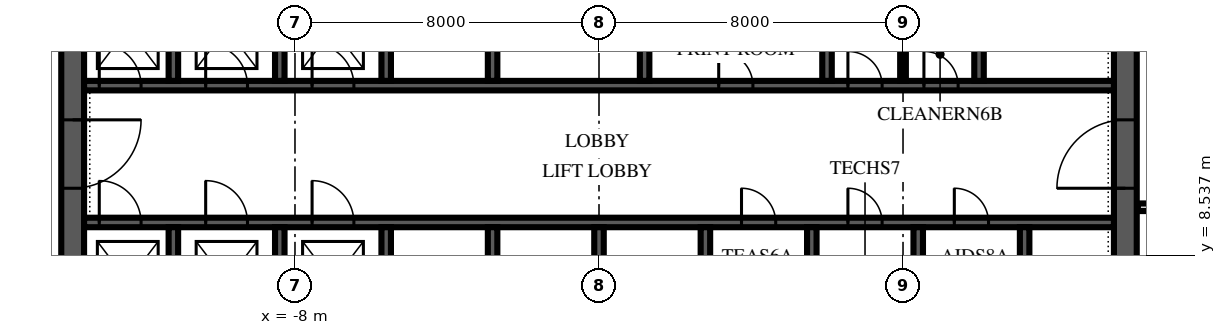
"""IFC4 building model, lengths in metres.
Left out: names, types, materials, properties, quantities, classifications, styles, units other than length and angle.
Written with IfcOpenShell. Run it as: python <this file> out.ifc"""

import sys

from ifc_helpers import new_model, si_unit, direction, frame, frame_2d, origin, place, context, subcontext, project, spatial, polyline, rectangle, outline, extrude, element, fill, save


model = new_model("IFC4")
c1 = context("Model", 3, precision=1e-05, world=origin(), true_north=direction((0.0, 1.0)))
c2 = subcontext(c1, "Body", "Model", "MODEL_VIEW")
j1 = project(units=[si_unit("LENGTHUNIT", "METRE"), si_unit("PLANEANGLEUNIT", "RADIAN")], contexts=[c1])
p1 = place(None, origin())
s1 = spatial("IfcSite", under=j1, at=p1, CompositionType="ELEMENT")
p2 = place(p1, origin())
s2 = spatial("IfcBuilding", under=s1, at=p2, CompositionType="ELEMENT")
p3 = place(p2, frame((0.0, 0.0, 214.0)))
s3 = spatial("IfcBuildingStorey", under=s2, at=p3, CompositionType="ELEMENT", Elevation=214.0)
p4 = place(p3, frame((13.85, 6.15, 0.0), z_axis=(0.0, 0.0, 1.0), x_axis=(0.0, 1.0, 0.0)))
e1 = element("IfcWall", 1, at=p4, inside=s3, PredefinedType="SHEAR", context=c2, shape_type="SweptSolid", body=[
    extrude(outline(polyline([(0.0, -0.3), (17.7, -0.3), (17.7, 0.0), (17.4, 0.0), (17.4, 0.3), (0.3, 0.3), (0.3, 0.0), (0.0, 0.0), (0.0, -0.3)])), origin(), (0.0, 0.0, 1.0), 4.0),
])
p5 = place(p4, frame((4.15, 0.0, 0.0)))
e2 = element("IfcOpeningElement", 2, at=p5, cuts=e1, PredefinedType="OPENING", context=c2, shape_type="SweptSolid", body=[
    extrude(rectangle(XDim=1.8, YDim=2.4, at=frame_2d((0.9, 1.2))), frame((0.0, 0.315, 0.0), z_axis=(0.0, -1.0, 0.0), x_axis=(1.0, 0.0, 0.0)), (0.0, 0.0, 1.0), 0.63),
])
p6 = place(p3, frame((-13.85, 23.85, 0.0), z_axis=(0.0, 0.0, 1.0), x_axis=(0.0, -1.0, 0.0)))
e3 = element("IfcWall", 3, at=p6, inside=s3, PredefinedType="SHEAR", context=c2, shape_type="SweptSolid", body=[
    extrude(outline(polyline([(0.0, -0.3), (17.7, -0.3), (17.7, 0.0), (17.4, 0.0), (17.4, 0.3), (0.3, 0.3), (0.3, 0.0), (0.0, 0.0), (0.0, -0.3)])), origin(), (0.0, 0.0, 1.0), 4.0),
])
p7 = place(p6, frame((11.75, 0.0, 0.0)))
e4 = element("IfcOpeningElement", 4, at=p7, cuts=e3, PredefinedType="OPENING", context=c2, shape_type="SweptSolid", body=[
    extrude(rectangle(XDim=1.8, YDim=2.4, at=frame_2d((0.9, 1.2))), frame((0.0, 0.315, 0.0), z_axis=(0.0, -1.0, 0.0), x_axis=(1.0, 0.0, 0.0)), (0.0, 0.0, 1.0), 0.63),
])
p8 = place(p3, frame((-13.55, 9.4, 0.0), z_axis=(0.0, 0.0, 1.0), x_axis=(1.0, 0.0, 0.0)))
e5 = element("IfcWall", 5, at=p8, inside=s3, PredefinedType="SHEAR", context=c2, shape_type="SweptSolid", body=[
    extrude(rectangle(XDim=27.1, YDim=0.25, at=frame_2d((13.55, 0.0))), origin(), (0.0, 0.0, 1.0), 4.0),
])
p9 = place(p8, frame((0.4, 0.0, 0.0)))
e6 = element("IfcOpeningElement", 6, at=p9, cuts=e5, PredefinedType="OPENING", context=c2, shape_type="SweptSolid", body=[
    extrude(rectangle(XDim=1.1, YDim=2.1, at=frame_2d((0.55, 1.05))), frame((0.0, 0.14, 0.0), z_axis=(0.0, -1.0, 0.0), x_axis=(1.0, 0.0, 0.0)), (0.0, 0.0, 1.0), 0.28),
])
p10 = place(p8, frame((3.2, 0.0, 0.0)))
e7 = element("IfcOpeningElement", 7, at=p10, cuts=e5, PredefinedType="OPENING", context=c2, shape_type="SweptSolid", body=[
    extrude(rectangle(XDim=1.1, YDim=2.1, at=frame_2d((0.55, 1.05))), frame((0.0, 0.14, 0.0), z_axis=(0.0, -1.0, 0.0), x_axis=(1.0, 0.0, 0.0)), (0.0, 0.0, 1.0), 0.28),
])
p11 = place(p8, frame((6.0, 0.0, 0.0)))
e8 = element("IfcOpeningElement", 8, at=p11, cuts=e5, PredefinedType="OPENING", context=c2, shape_type="SweptSolid", body=[
    extrude(rectangle(XDim=1.1, YDim=2.1, at=frame_2d((0.55, 1.05))), frame((0.0, 0.14, 0.0), z_axis=(0.0, -1.0, 0.0), x_axis=(1.0, 0.0, 0.0)), (0.0, 0.0, 1.0), 0.28),
])
p12 = place(p8, frame((17.3, 0.0, 0.0)))
e9 = element("IfcOpeningElement", 9, at=p12, cuts=e5, PredefinedType="OPENING", context=c2, shape_type="SweptSolid", body=[
    extrude(rectangle(XDim=0.9, YDim=2.1, at=frame_2d((0.45, 1.05))), frame((0.0, 0.14, 0.0), z_axis=(0.0, -1.0, 0.0), x_axis=(1.0, 0.0, 0.0)), (0.0, 0.0, 1.0), 0.28),
])
p13 = place(p8, frame((20.1, 0.0, 0.0)))
e10 = element("IfcOpeningElement", 10, at=p13, cuts=e5, PredefinedType="OPENING", context=c2, shape_type="SweptSolid", body=[
    extrude(rectangle(XDim=0.9, YDim=2.1, at=frame_2d((0.45, 1.05))), frame((0.0, 0.14, 0.0), z_axis=(0.0, -1.0, 0.0), x_axis=(1.0, 0.0, 0.0)), (0.0, 0.0, 1.0), 0.28),
])
p14 = place(p8, frame((22.9, 0.0, 0.0)))
e11 = element("IfcOpeningElement", 11, at=p14, cuts=e5, PredefinedType="OPENING", context=c2, shape_type="SweptSolid", body=[
    extrude(rectangle(XDim=0.9, YDim=2.1, at=frame_2d((0.45, 1.05))), frame((0.0, 0.14, 0.0), z_axis=(0.0, -1.0, 0.0), x_axis=(1.0, 0.0, 0.0)), (0.0, 0.0, 1.0), 0.28),
])
p15 = place(p3, frame((-13.55, 13.0, 0.0), z_axis=(0.0, 0.0, 1.0), x_axis=(1.0, 0.0, 0.0)))
e12 = element("IfcWall", 12, at=p15, inside=s3, PredefinedType="SHEAR", context=c2, shape_type="SweptSolid", body=[
    extrude(rectangle(XDim=27.1, YDim=0.25, at=frame_2d((13.55, 0.0))), origin(), (0.0, 0.0, 1.0), 4.0),
])
p16 = place(p15, frame((0.4, 0.0, 0.0)))
e13 = element("IfcOpeningElement", 13, at=p16, cuts=e12, PredefinedType="OPENING", context=c2, shape_type="SweptSolid", body=[
    extrude(rectangle(XDim=1.1, YDim=2.1, at=frame_2d((0.55, 1.05))), frame((0.0, 0.14, 0.0), z_axis=(0.0, -1.0, 0.0), x_axis=(1.0, 0.0, 0.0)), (0.0, 0.0, 1.0), 0.28),
])
p17 = place(p15, frame((3.2, 0.0, 0.0)))
e14 = element("IfcOpeningElement", 14, at=p17, cuts=e12, PredefinedType="OPENING", context=c2, shape_type="SweptSolid", body=[
    extrude(rectangle(XDim=1.1, YDim=2.1, at=frame_2d((0.55, 1.05))), frame((0.0, 0.14, 0.0), z_axis=(0.0, -1.0, 0.0), x_axis=(1.0, 0.0, 0.0)), (0.0, 0.0, 1.0), 0.28),
])
p18 = place(p15, frame((6.0, 0.0, 0.0)))
e15 = element("IfcOpeningElement", 15, at=p18, cuts=e12, PredefinedType="OPENING", context=c2, shape_type="SweptSolid", body=[
    extrude(rectangle(XDim=1.1, YDim=2.1, at=frame_2d((0.55, 1.05))), frame((0.0, 0.14, 0.0), z_axis=(0.0, -1.0, 0.0), x_axis=(1.0, 0.0, 0.0)), (0.0, 0.0, 1.0), 0.28),
])
p19 = place(p15, frame((16.7, 0.0, 0.0)))
e16 = element("IfcOpeningElement", 16, at=p19, cuts=e12, PredefinedType="OPENING", context=c2, shape_type="SweptSolid", body=[
    extrude(rectangle(XDim=0.9, YDim=2.1, at=frame_2d((0.45, 1.05))), frame((0.0, 0.14, 0.0), z_axis=(0.0, -1.0, 0.0), x_axis=(1.0, 0.0, 0.0)), (0.0, 0.0, 1.0), 0.28),
])
p20 = place(p15, frame((20.1, 0.0, 0.0)))
e17 = element("IfcOpeningElement", 17, at=p20, cuts=e12, PredefinedType="OPENING", context=c2, shape_type="SweptSolid", body=[
    extrude(rectangle(XDim=0.9, YDim=2.1, at=frame_2d((0.45, 1.05))), frame((0.0, 0.14, 0.0), z_axis=(0.0, -1.0, 0.0), x_axis=(1.0, 0.0, 0.0)), (0.0, 0.0, 1.0), 0.28),
])
p21 = place(p15, frame((22.1, 0.0, 0.0)))
e18 = element("IfcOpeningElement", 18, at=p21, cuts=e12, PredefinedType="OPENING", context=c2, shape_type="SweptSolid", body=[
    extrude(rectangle(XDim=0.9, YDim=2.1, at=frame_2d((0.45, 1.05))), frame((0.0, 0.14, 0.0), z_axis=(0.0, -1.0, 0.0), x_axis=(1.0, 0.0, 0.0)), (0.0, 0.0, 1.0), 0.28),
])
for number, where, z_axis, x_axis in (
    (19, (-11.2, 6.45, 0.0), (0.0, 0.0, 1.0), (0.0, 1.0, 0.0)),
    (20, (-8.4, 6.45, 0.0), (0.0, 0.0, 1.0), (0.0, 1.0, 0.0)),
    (21, (-5.6, 6.45, 0.0), (0.0, 0.0, 1.0), (0.0, 1.0, 0.0)),
    (22, (-2.8, 6.45, 0.0), (0.0, 0.0, 1.0), (0.0, 1.0, 0.0)),
    (23, (0.0, 6.45, 0.0), (0.0, 0.0, 1.0), (0.0, 1.0, 0.0)),
    (24, (2.8, 6.45, 0.0), (0.0, 0.0, 1.0), (0.0, 1.0, 0.0)),
    (25, (5.6, 6.45, 0.0), (0.0, 0.0, 1.0), (0.0, 1.0, 0.0)),
    (26, (8.4, 6.45, 0.0), (0.0, 0.0, 1.0), (0.0, 1.0, 0.0)),
    (27, (11.2, 6.45, 0.0), (0.0, 0.0, 1.0), (0.0, 1.0, 0.0)),
):
    element("IfcWall", number, at=place(p3, frame(where, z_axis=z_axis, x_axis=x_axis)), inside=s3, PredefinedType="SHEAR", context=c2, shape_type="SweptSolid", body=[
        extrude(rectangle(XDim=2.825, YDim=0.25, at=frame_2d((1.413, 0.0))), origin(), (0.0, 0.0, 1.0), 4.0),
    ])
for number, where, z_axis, x_axis in (
    (28, (-11.2, 13.125, 0.0), (0.0, 0.0, 1.0), (0.0, 1.0, 0.0)),
    (29, (-8.4, 13.125, 0.0), (0.0, 0.0, 1.0), (0.0, 1.0, 0.0)),
    (30, (-5.6, 13.125, 0.0), (0.0, 0.0, 1.0), (0.0, 1.0, 0.0)),
    (31, (-2.8, 13.125, 0.0), (0.0, 0.0, 1.0), (0.0, 1.0, 0.0)),
    (32, (1.2, 13.125, 0.0), (0.0, 0.0, 1.0), (0.0, 1.0, 0.0)),
    (33, (6.0, 13.125, 0.0), (0.0, 0.0, 1.0), (0.0, 1.0, 0.0)),
    (34, (10.0, 13.125, 0.0), (0.0, 0.0, 1.0), (0.0, 1.0, 0.0)),
):
    element("IfcWall", number, at=place(p3, frame(where, z_axis=z_axis, x_axis=x_axis)), inside=s3, PredefinedType="SHEAR", context=c2, shape_type="SweptSolid", body=[
        extrude(rectangle(XDim=2.75, YDim=0.25, at=frame_2d((1.375, 0.0))), origin(), (0.0, 0.0, 1.0), 4.0),
    ])
p22 = place(p3, frame((8.0, 13.125, 0.0), z_axis=(0.0, 0.0, 1.0), x_axis=(0.0, 1.0, 0.0)))
e35 = element("IfcWall", 35, at=p22, inside=s3, PredefinedType="PARTITIONING", context=c2, shape_type="SweptSolid", body=[
    extrude(rectangle(XDim=1.55, YDim=0.15, at=frame_2d((0.775, 0.0))), origin(), (0.0, 0.0, 1.0), 3.85),
])
p23 = place(p3, frame((14.18, 9.8, 0.0), z_axis=(0.0, 0.0, 1.0), x_axis=(1.0, 0.0, 0.0)))
e36 = element("IfcWall", 36, at=p23, inside=s3, PredefinedType="PARTITIONING", context=c2, shape_type="SweptSolid", body=[
    extrude(rectangle(XDim=2.02, YDim=0.2, at=frame_2d((1.01, 0.0))), origin(), (0.0, 0.0, 1.0), 3.85),
])
p24 = place(p5, origin())
e37 = element("IfcDoor", 37, at=p24, inside=s3, OperationType="DOUBLE_DOOR_SINGLE_SWING", PredefinedType="DOOR", context=c2, shape_type="SweptSolid", body=[
    extrude(rectangle(XDim=1.8, YDim=2.4, at=frame_2d((0.9, 1.2))), frame((0.0, 0.3, 0.0), z_axis=(0.0, -1.0, 0.0), x_axis=(1.0, 0.0, 0.0)), (0.0, 0.0, 1.0), 0.6),
])
fill(e2, e37)
p25 = place(p7, origin())
e38 = element("IfcDoor", 38, at=p25, inside=s3, OperationType="DOUBLE_DOOR_SINGLE_SWING", PredefinedType="DOOR", context=c2, shape_type="SweptSolid", body=[
    extrude(rectangle(XDim=1.8, YDim=2.4, at=frame_2d((0.9, 1.2))), frame((0.0, 0.3, 0.0), z_axis=(0.0, -1.0, 0.0), x_axis=(1.0, 0.0, 0.0)), (0.0, 0.0, 1.0), 0.6),
])
fill(e4, e38)
p26 = place(p9, origin())
e39 = element("IfcDoor", 39, at=p26, inside=s3, OperationType="SLIDING_TO_LEFT", PredefinedType="DOOR", context=c2, shape_type="SweptSolid", body=[
    extrude(rectangle(XDim=1.1, YDim=2.1, at=frame_2d((0.55, 1.05))), frame((0.0, 0.125, 0.0), z_axis=(0.0, -1.0, 0.0), x_axis=(1.0, 0.0, 0.0)), (0.0, 0.0, 1.0), 0.25),
])
fill(e6, e39)
p27 = place(p10, origin())
e40 = element("IfcDoor", 40, at=p27, inside=s3, OperationType="SLIDING_TO_LEFT", PredefinedType="DOOR", context=c2, shape_type="SweptSolid", body=[
    extrude(rectangle(XDim=1.1, YDim=2.1, at=frame_2d((0.55, 1.05))), frame((0.0, 0.125, 0.0), z_axis=(0.0, -1.0, 0.0), x_axis=(1.0, 0.0, 0.0)), (0.0, 0.0, 1.0), 0.25),
])
fill(e7, e40)
p28 = place(p11, origin())
e41 = element("IfcDoor", 41, at=p28, inside=s3, OperationType="SLIDING_TO_LEFT", PredefinedType="DOOR", context=c2, shape_type="SweptSolid", body=[
    extrude(rectangle(XDim=1.1, YDim=2.1, at=frame_2d((0.55, 1.05))), frame((0.0, 0.125, 0.0), z_axis=(0.0, -1.0, 0.0), x_axis=(1.0, 0.0, 0.0)), (0.0, 0.0, 1.0), 0.25),
])
fill(e8, e41)
p29 = place(p16, origin())
e42 = element("IfcDoor", 42, at=p29, inside=s3, OperationType="SLIDING_TO_LEFT", PredefinedType="DOOR", context=c2, shape_type="SweptSolid", body=[
    extrude(rectangle(XDim=1.1, YDim=2.1, at=frame_2d((0.55, 1.05))), frame((0.0, 0.125, 0.0), z_axis=(0.0, -1.0, 0.0), x_axis=(1.0, 0.0, 0.0)), (0.0, 0.0, 1.0), 0.25),
])
fill(e13, e42)
p30 = place(p17, origin())
e43 = element("IfcDoor", 43, at=p30, inside=s3, OperationType="SLIDING_TO_LEFT", PredefinedType="DOOR", context=c2, shape_type="SweptSolid", body=[
    extrude(rectangle(XDim=1.1, YDim=2.1, at=frame_2d((0.55, 1.05))), frame((0.0, 0.125, 0.0), z_axis=(0.0, -1.0, 0.0), x_axis=(1.0, 0.0, 0.0)), (0.0, 0.0, 1.0), 0.25),
])
fill(e14, e43)
p31 = place(p18, origin())
e44 = element("IfcDoor", 44, at=p31, inside=s3, OperationType="SLIDING_TO_LEFT", PredefinedType="DOOR", context=c2, shape_type="SweptSolid", body=[
    extrude(rectangle(XDim=1.1, YDim=2.1, at=frame_2d((0.55, 1.05))), frame((0.0, 0.125, 0.0), z_axis=(0.0, -1.0, 0.0), x_axis=(1.0, 0.0, 0.0)), (0.0, 0.0, 1.0), 0.25),
])
fill(e15, e44)
p32 = place(p19, origin())
e45 = element("IfcDoor", 45, at=p32, inside=s3, OperationType="SINGLE_SWING_LEFT", PredefinedType="DOOR", context=c2, shape_type="SweptSolid", body=[
    extrude(rectangle(XDim=0.9, YDim=2.1, at=frame_2d((0.45, 1.05))), frame((0.0, 0.125, 0.0), z_axis=(0.0, -1.0, 0.0), x_axis=(1.0, 0.0, 0.0)), (0.0, 0.0, 1.0), 0.25),
])
fill(e16, e45)
p33 = place(p20, origin())
e46 = element("IfcDoor", 46, at=p33, inside=s3, OperationType="SINGLE_SWING_LEFT", PredefinedType="DOOR", context=c2, shape_type="SweptSolid", body=[
    extrude(rectangle(XDim=0.9, YDim=2.1, at=frame_2d((0.45, 1.05))), frame((0.0, 0.125, 0.0), z_axis=(0.0, -1.0, 0.0), x_axis=(1.0, 0.0, 0.0)), (0.0, 0.0, 1.0), 0.25),
])
fill(e17, e46)
p34 = place(p21, origin())
e47 = element("IfcDoor", 47, at=p34, inside=s3, OperationType="SINGLE_SWING_LEFT", PredefinedType="DOOR", context=c2, shape_type="SweptSolid", body=[
    extrude(rectangle(XDim=0.9, YDim=2.1, at=frame_2d((0.45, 1.05))), frame((0.0, 0.125, 0.0), z_axis=(0.0, -1.0, 0.0), x_axis=(1.0, 0.0, 0.0)), (0.0, 0.0, 1.0), 0.25),
])
fill(e18, e47)
p35 = place(p12, origin())
e48 = element("IfcDoor", 48, at=p35, inside=s3, OperationType="SINGLE_SWING_LEFT", PredefinedType="DOOR", context=c2, shape_type="SweptSolid", body=[
    extrude(rectangle(XDim=0.9, YDim=2.1, at=frame_2d((0.45, 1.05))), frame((0.0, 0.125, 0.0), z_axis=(0.0, -1.0, 0.0), x_axis=(1.0, 0.0, 0.0)), (0.0, 0.0, 1.0), 0.25),
])
fill(e9, e48)
p36 = place(p13, origin())
e49 = element("IfcDoor", 49, at=p36, inside=s3, OperationType="SINGLE_SWING_LEFT", PredefinedType="DOOR", context=c2, shape_type="SweptSolid", body=[
    extrude(rectangle(XDim=0.9, YDim=2.1, at=frame_2d((0.45, 1.05))), frame((0.0, 0.125, 0.0), z_axis=(0.0, -1.0, 0.0), x_axis=(1.0, 0.0, 0.0)), (0.0, 0.0, 1.0), 0.25),
])
fill(e10, e49)
p37 = place(p14, origin())
e50 = element("IfcDoor", 50, at=p37, inside=s3, OperationType="SINGLE_SWING_LEFT", PredefinedType="DOOR", context=c2, shape_type="SweptSolid", body=[
    extrude(rectangle(XDim=0.9, YDim=2.1, at=frame_2d((0.45, 1.05))), frame((0.0, 0.125, 0.0), z_axis=(0.0, -1.0, 0.0), x_axis=(1.0, 0.0, 0.0)), (0.0, 0.0, 1.0), 0.25),
])
fill(e11, e50)
save(model, sys.argv[1])
